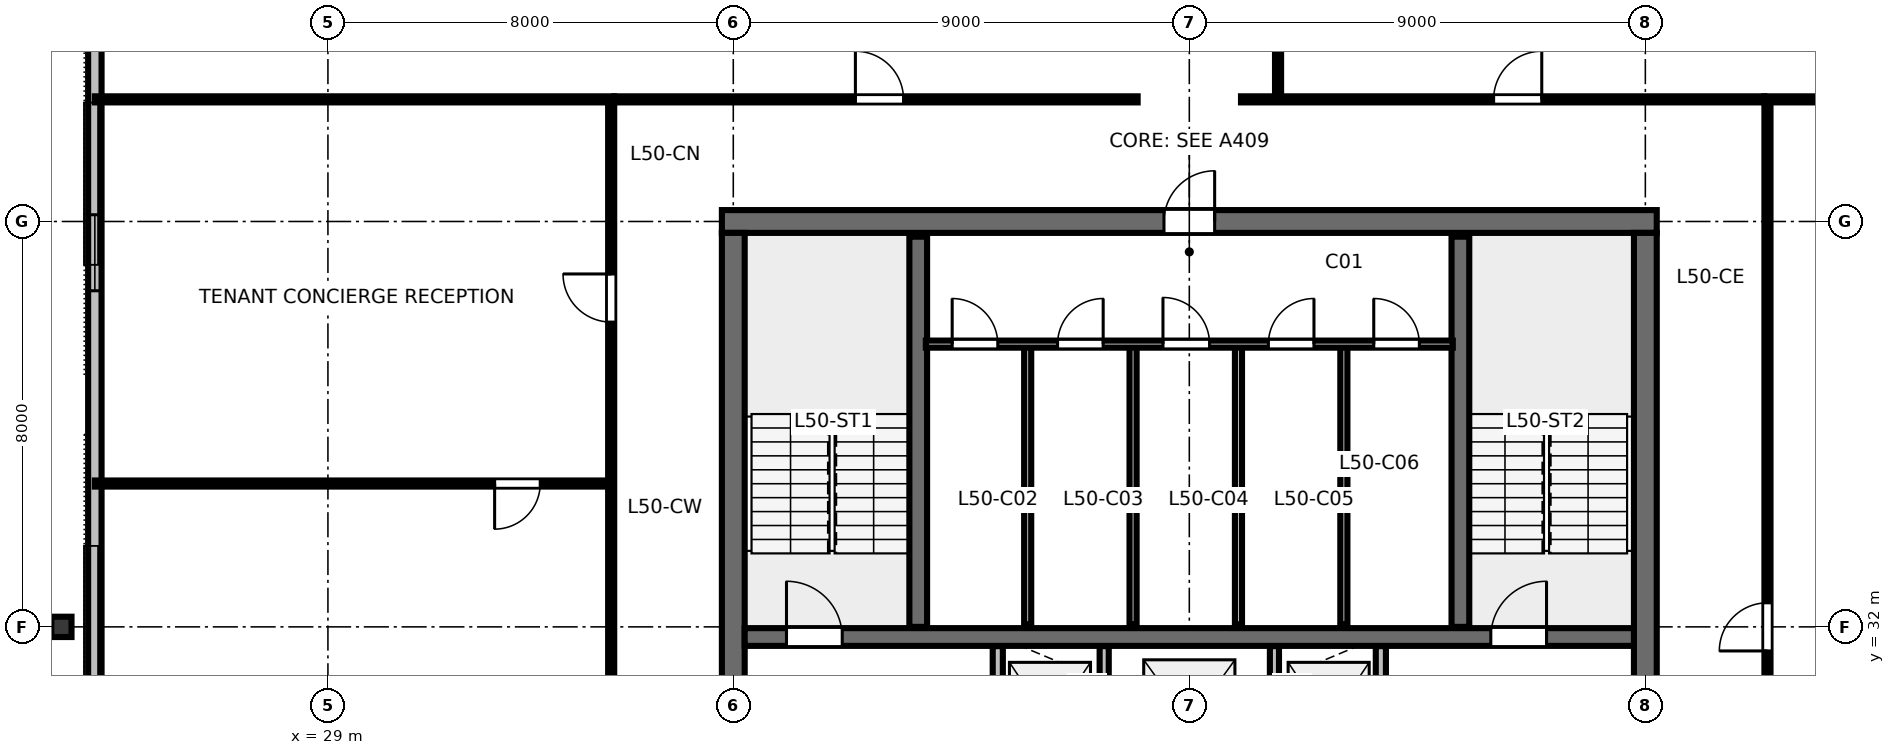
"""IFC4 building model, lengths in metres.
Left out: names, types, materials, properties, quantities, classifications, styles, units other than length and angle.
Written with IfcOpenShell. Run it as: python <this file> out.ifc"""

import sys

from ifc_helpers import new_model, si_unit, direction, frame, frame_2d, origin, origin_2d, place, context, subcontext, project, spatial, rectangle, i_section, extrude, element, fill, save


model = new_model("IFC4")
c1 = context("Model", 3, precision=1e-05, world=origin(), true_north=direction((0.0, 1.0)))
c2 = subcontext(c1, "Body", "Model", "MODEL_VIEW")
j1 = project(units=[si_unit("LENGTHUNIT", "METRE"), si_unit("PLANEANGLEUNIT", "RADIAN")], contexts=[c1])
p1 = place(None, origin())
s1 = spatial("IfcSite", under=j1, at=p1, CompositionType="ELEMENT")
p2 = place(p1, origin())
s2 = spatial("IfcBuilding", under=s1, at=p2, CompositionType="ELEMENT")
p3 = place(p2, frame((0.0, 0.0, 191.4)))
s3 = spatial("IfcBuildingStorey", under=s2, at=p3, CompositionType="ELEMENT", Elevation=191.4)
p4 = place(p3, frame((36.775, 40.0, 0.0), z_axis=(0.0, 0.0, 1.0), x_axis=(1.0, 0.0, 0.0)))
e1 = element("IfcWall", 1, at=p4, inside=s3, PredefinedType="SHEAR", context=c2, shape_type="SweptSolid", body=[
    extrude(rectangle(XDim=18.45, YDim=0.45, at=frame_2d((9.225, 0.0))), origin(), (0.0, 0.0, 1.0), 3.36),
])
p5 = place(p4, frame((8.725, 0.0, 0.0)))
e2 = element("IfcOpeningElement", 2, at=p5, cuts=e1, PredefinedType="OPENING", context=c2, shape_type="SweptSolid", body=[
    extrude(rectangle(XDim=1.0, YDim=2.15, at=frame_2d((0.5, 1.075))), frame((0.0, 0.235, 0.0), z_axis=(0.0, -1.0, 0.0), x_axis=(1.0, 0.0, 0.0)), (0.0, 0.0, 1.0), 0.47),
])
p6 = place(p3, frame((37.0, 24.225, 0.0), z_axis=(0.0, 0.0, 1.0), x_axis=(0.0, 1.0, 0.0)))
e3 = element("IfcWall", 3, at=p6, inside=s3, PredefinedType="SHEAR", context=c2, shape_type="SweptSolid", body=[
    extrude(rectangle(XDim=15.55, YDim=0.45, at=frame_2d((7.775, 0.0))), origin(), (0.0, 0.0, 1.0), 3.36),
])
p7 = place(p6, frame((5.3, 0.0, 0.0)))
e4 = element("IfcOpeningElement", 4, at=p7, cuts=e3, PredefinedType="OPENING", context=c2, shape_type="SweptSolid", body=[
    extrude(rectangle(XDim=1.15, YDim=2.15, at=frame_2d((0.575, 1.075))), frame((0.0, 0.235, 0.0), z_axis=(0.0, -1.0, 0.0), x_axis=(1.0, 0.0, 0.0)), (0.0, 0.0, 1.0), 0.47),
])
p8 = place(p3, frame((55.0, 24.225, 0.0), z_axis=(0.0, 0.0, 1.0), x_axis=(0.0, 1.0, 0.0)))
e5 = element("IfcWall", 5, at=p8, inside=s3, PredefinedType="SHEAR", context=c2, shape_type="SweptSolid", body=[
    extrude(rectangle(XDim=15.55, YDim=0.45, at=frame_2d((7.775, 0.0))), origin(), (0.0, 0.0, 1.0), 3.36),
])
p9 = place(p8, frame((5.3, 0.0, 0.0)))
e6 = element("IfcOpeningElement", 6, at=p9, cuts=e5, PredefinedType="OPENING", context=c2, shape_type="SweptSolid", body=[
    extrude(rectangle(XDim=1.15, YDim=2.15, at=frame_2d((0.575, 1.075))), frame((0.0, 0.235, 0.0), z_axis=(0.0, -1.0, 0.0), x_axis=(1.0, 0.0, 0.0)), (0.0, 0.0, 1.0), 0.47),
])
p10 = place(p3, frame((37.225, 31.8, 0.0), z_axis=(0.0, 0.0, 1.0), x_axis=(1.0, 0.0, 0.0)))
e7 = element("IfcWall", 7, at=p10, inside=s3, PredefinedType="SHEAR", context=c2, shape_type="SweptSolid", body=[
    extrude(rectangle(XDim=17.55, YDim=0.35, at=frame_2d((8.775, 0.0))), origin(), (0.0, 0.0, 1.0), 3.36),
])
p11 = place(p10, frame((0.825, 0.0, 0.0)))
e8 = element("IfcOpeningElement", 8, at=p11, cuts=e7, PredefinedType="OPENING", context=c2, shape_type="SweptSolid", body=[
    extrude(rectangle(XDim=1.1, YDim=2.15, at=frame_2d((0.55, 1.075))), frame((0.0, 0.185, 0.0), z_axis=(0.0, -1.0, 0.0), x_axis=(1.0, 0.0, 0.0)), (0.0, 0.0, 1.0), 0.37),
])
p12 = place(p10, frame((14.725, 0.0, 0.0)))
e9 = element("IfcOpeningElement", 9, at=p12, cuts=e7, PredefinedType="OPENING", context=c2, shape_type="SweptSolid", body=[
    extrude(rectangle(XDim=1.1, YDim=2.15, at=frame_2d((0.55, 1.075))), frame((0.0, 0.185, 0.0), z_axis=(0.0, -1.0, 0.0), x_axis=(1.0, 0.0, 0.0)), (0.0, 0.0, 1.0), 0.37),
])
p13 = place(p3, frame((23.74, 32.0, 0.0), z_axis=(0.0, 0.0, 1.0), x_axis=(0.0, 1.0, 0.0)))
e10 = element("IfcColumn", 10, at=p13, inside=s3, PredefinedType="COLUMN", context=c2, shape_type="SweptSolid", body=[
    extrude(i_section(OverallWidth=0.401, OverallDepth=0.399, WebThickness=0.025, FlangeThickness=0.04, FilletRadius=0.025, at=origin_2d()), origin(), (0.0, 0.0, 1.0), 3.373),
])
p14 = place(p3, frame((24.4, 46.02, 0.0), z_axis=(0.0, 0.0, 1.0), x_axis=(0.0, -1.0, 0.0)))
e11 = element("IfcWall", 11, at=p14, inside=s3, PredefinedType="STANDARD", context=c2, shape_type="SweptSolid", body=[
    extrude(rectangle(XDim=28.04, YDim=0.265, at=frame_2d((14.02, 0.0))), origin(), (0.0, 0.0, 1.0), 3.375),
])
p15 = place(p14, frame((5.887, 0.0, 0.85)))
e12 = element("IfcOpeningElement", 12, at=p15, cuts=e11, PredefinedType="OPENING", context=c2, shape_type="SweptSolid", body=[
    extrude(rectangle(XDim=1.5, YDim=1.85, at=frame_2d((0.75, 0.925))), frame((0.0, 0.142, 0.0), z_axis=(0.0, -1.0, 0.0), x_axis=(1.0, 0.0, 0.0)), (0.0, 0.0, 1.0), 0.285),
])
p16 = place(p14, frame((16.961, 0.0, 0.85)))
e13 = element("IfcOpeningElement", 13, at=p16, cuts=e11, PredefinedType="OPENING", context=c2, shape_type="SweptSolid", body=[
    extrude(rectangle(XDim=1.5, YDim=1.85, at=frame_2d((0.75, 0.925))), frame((0.0, 0.142, 0.0), z_axis=(0.0, -1.0, 0.0), x_axis=(1.0, 0.0, 0.0)), (0.0, 0.0, 1.0), 0.285),
])
p17 = place(p14, frame((20.653, 0.0, 0.85)))
e14 = element("IfcOpeningElement", 14, at=p17, cuts=e11, PredefinedType="OPENING", context=c2, shape_type="SweptSolid", body=[
    extrude(rectangle(XDim=1.5, YDim=1.85, at=frame_2d((0.75, 0.925))), frame((0.0, 0.142, 0.0), z_axis=(0.0, -1.0, 0.0), x_axis=(1.0, 0.0, 0.0)), (0.0, 0.0, 1.0), 0.285),
])
for number, where, z_axis, x_axis in (
    (15, (40.65, 32.0, 0.0), (0.0, 0.0, 1.0), (0.0, 1.0, 0.0)),
    (16, (51.35, 32.0, 0.0), (0.0, 0.0, 1.0), (0.0, 1.0, 0.0)),
):
    element("IfcWall", number, at=place(p3, frame(where, z_axis=z_axis, x_axis=x_axis)), inside=s3, PredefinedType="SHEAR", context=c2, shape_type="SweptSolid", body=[
        extrude(rectangle(XDim=7.7, YDim=0.35, at=frame_2d((3.85, 0.0))), origin(), (0.0, 0.0, 1.0), 3.6),
    ])
for number, where, z_axis, x_axis in (
    (17, (42.81, 32.05, 0.0), (0.0, 0.0, 1.0), (0.0, 1.0, 0.0)),
    (18, (44.89, 32.05, 0.0), (0.0, 0.0, 1.0), (0.0, 1.0, 0.0)),
    (19, (46.97, 32.05, 0.0), (0.0, 0.0, 1.0), (0.0, 1.0, 0.0)),
    (20, (49.05, 32.05, 0.0), (0.0, 0.0, 1.0), (0.0, 1.0, 0.0)),
):
    element("IfcWall", number, at=place(p3, frame(where, z_axis=z_axis, x_axis=x_axis)), inside=s3, PredefinedType="PARTITIONING", context=c2, shape_type="SweptSolid", body=[
        extrude(rectangle(XDim=5.5, YDim=0.14, at=frame_2d((2.75, 0.0))), origin(), (0.0, 0.0, 1.0), 3.375),
    ])
p18 = place(p3, frame((40.8, 37.58, 0.0), z_axis=(0.0, 0.0, 1.0), x_axis=(1.0, 0.0, 0.0)))
e21 = element("IfcWall", 21, at=p18, inside=s3, PredefinedType="PARTITIONING", context=c2, shape_type="SweptSolid", body=[
    extrude(rectangle(XDim=10.4, YDim=0.14, at=frame_2d((5.2, 0.0))), origin(), (0.0, 0.0, 1.0), 3.375),
])
p19 = place(p18, frame((0.52, 0.0, 0.0)))
e22 = element("IfcOpeningElement", 22, at=p19, cuts=e21, PredefinedType="OPENING", context=c2, shape_type="SweptSolid", body=[
    extrude(rectangle(XDim=0.9, YDim=2.15, at=frame_2d((0.45, 1.075))), frame((0.0, 0.08, 0.0), z_axis=(0.0, -1.0, 0.0), x_axis=(1.0, 0.0, 0.0)), (0.0, 0.0, 1.0), 0.16),
])
p20 = place(p18, frame((2.6, 0.0, 0.0)))
e23 = element("IfcOpeningElement", 23, at=p20, cuts=e21, PredefinedType="OPENING", context=c2, shape_type="SweptSolid", body=[
    extrude(rectangle(XDim=0.9, YDim=2.15, at=frame_2d((0.45, 1.075))), frame((0.0, 0.08, 0.0), z_axis=(0.0, -1.0, 0.0), x_axis=(1.0, 0.0, 0.0)), (0.0, 0.0, 1.0), 0.16),
])
p21 = place(p18, frame((4.68, 0.0, 0.0)))
e24 = element("IfcOpeningElement", 24, at=p21, cuts=e21, PredefinedType="OPENING", context=c2, shape_type="SweptSolid", body=[
    extrude(rectangle(XDim=0.92, YDim=2.15, at=frame_2d((0.46, 1.075))), frame((0.0, 0.08, 0.0), z_axis=(0.0, -1.0, 0.0), x_axis=(1.0, 0.0, 0.0)), (0.0, 0.0, 1.0), 0.16),
])
p22 = place(p18, frame((6.76, 0.0, 0.0)))
e25 = element("IfcOpeningElement", 25, at=p22, cuts=e21, PredefinedType="OPENING", context=c2, shape_type="SweptSolid", body=[
    extrude(rectangle(XDim=0.9, YDim=2.15, at=frame_2d((0.45, 1.075))), frame((0.0, 0.08, 0.0), z_axis=(0.0, -1.0, 0.0), x_axis=(1.0, 0.0, 0.0)), (0.0, 0.0, 1.0), 0.16),
])
p23 = place(p18, frame((8.84, 0.0, 0.0)))
e26 = element("IfcOpeningElement", 26, at=p23, cuts=e21, PredefinedType="OPENING", context=c2, shape_type="SweptSolid", body=[
    extrude(rectangle(XDim=0.9, YDim=2.15, at=frame_2d((0.45, 1.075))), frame((0.0, 0.08, 0.0), z_axis=(0.0, -1.0, 0.0), x_axis=(1.0, 0.0, 0.0)), (0.0, 0.0, 1.0), 0.16),
])
p24 = place(p3, frame((42.22, 28.58, 0.0), z_axis=(0.0, 0.0, 1.0), x_axis=(0.0, 1.0, 0.0)))
e27 = element("IfcWall", 27, at=p24, inside=s3, PredefinedType="PARTITIONING", context=c2, shape_type="SweptSolid", body=[
    extrude(rectangle(XDim=3.04, YDim=0.2, at=frame_2d((1.52, 0.0))), origin(), (0.0, 0.0, 1.0), 3.375),
])
p25 = place(p24, frame((0.95, 0.0, 0.0)))
e28 = element("IfcOpeningElement", 28, at=p25, cuts=e27, PredefinedType="OPENING", context=c2, shape_type="SweptSolid", body=[
    extrude(rectangle(XDim=1.05, YDim=2.15, at=frame_2d((0.525, 1.075))), frame((0.0, 0.11, 0.0), z_axis=(0.0, -1.0, 0.0), x_axis=(1.0, 0.0, 0.0)), (0.0, 0.0, 1.0), 0.22),
])
p26 = place(p3, frame((49.78, 28.58, 0.0), z_axis=(0.0, 0.0, 1.0), x_axis=(0.0, 1.0, 0.0)))
e29 = element("IfcWall", 29, at=p26, inside=s3, PredefinedType="PARTITIONING", context=c2, shape_type="SweptSolid", body=[
    extrude(rectangle(XDim=3.04, YDim=0.2, at=frame_2d((1.52, 0.0))), origin(), (0.0, 0.0, 1.0), 3.375),
])
p27 = place(p26, frame((0.95, 0.0, 0.0)))
e30 = element("IfcOpeningElement", 30, at=p27, cuts=e29, PredefinedType="OPENING", context=c2, shape_type="SweptSolid", body=[
    extrude(rectangle(XDim=1.05, YDim=2.15, at=frame_2d((0.525, 1.075))), frame((0.0, 0.11, 0.0), z_axis=(0.0, -1.0, 0.0), x_axis=(1.0, 0.0, 0.0)), (0.0, 0.0, 1.0), 0.22),
])
for number, where, z_axis, x_axis in (
    (31, (44.32, 28.58, 0.0), (0.0, 0.0, 1.0), (0.0, 1.0, 0.0)),
    (32, (47.68, 28.58, 0.0), (0.0, 0.0, 1.0), (0.0, 1.0, 0.0)),
):
    element("IfcWall", number, at=place(p3, frame(where, z_axis=z_axis, x_axis=x_axis)), inside=s3, PredefinedType="PARTITIONING", context=c2, shape_type="SweptSolid", body=[
        extrude(rectangle(XDim=3.04, YDim=0.18, at=frame_2d((1.52, 0.0))), origin(), (0.0, 0.0, 1.0), 3.375),
    ])
p28 = place(p3, frame((47.751, 42.41, 0.0), z_axis=(0.0, 0.0, 1.0), x_axis=(0.0, 1.0, 0.0)))
e33 = element("IfcWall", 33, at=p28, inside=s3, PredefinedType="PARTITIONING", context=c2, shape_type="SweptSolid", body=[
    extrude(rectangle(XDim=8.67, YDim=0.12, at=frame_2d((4.335, 0.0))), origin(), (0.0, 0.0, 1.0), 2.655),
])
p29 = place(p28, frame((1.4, 0.0, 0.0)))
e34 = element("IfcOpeningElement", 34, at=p29, cuts=e33, PredefinedType="OPENING", context=c2, shape_type="SweptSolid", body=[
    extrude(rectangle(XDim=0.9, YDim=2.15, at=frame_2d((0.45, 1.075))), frame((0.0, 0.07, 0.0), z_axis=(0.0, -1.0, 0.0), x_axis=(1.0, 0.0, 0.0)), (0.0, 0.0, 1.0), 0.14),
])
p30 = place(p3, frame((34.65, 42.41, 0.0), z_axis=(0.0, 0.0, 1.0), x_axis=(1.0, 0.0, 0.0)))
e35 = element("IfcWall", 35, at=p30, inside=s3, PredefinedType="PARTITIONING", context=c2, shape_type="SweptSolid", body=[
    extrude(rectangle(XDim=10.33, YDim=0.12, at=frame_2d((5.165, 0.0))), origin(), (0.0, 0.0, 1.0), 2.655),
])
p31 = place(p30, frame((4.76, 0.0, 0.0)))
e36 = element("IfcOpeningElement", 36, at=p31, cuts=e35, PredefinedType="OPENING", context=c2, shape_type="SweptSolid", body=[
    extrude(rectangle(XDim=0.95, YDim=2.15, at=frame_2d((0.475, 1.075))), frame((0.0, 0.07, 0.0), z_axis=(0.0, -1.0, 0.0), x_axis=(1.0, 0.0, 0.0)), (0.0, 0.0, 1.0), 0.14),
])
p32 = place(p3, frame((47.02, 42.41, 0.0), z_axis=(0.0, 0.0, 1.0), x_axis=(1.0, 0.0, 0.0)))
e37 = element("IfcWall", 37, at=p32, inside=s3, PredefinedType="PARTITIONING", context=c2, shape_type="SweptSolid", body=[
    extrude(rectangle(XDim=10.33, YDim=0.12, at=frame_2d((5.165, 0.0))), origin(), (0.0, 0.0, 1.0), 2.655),
])
p33 = place(p32, frame((4.986, 0.0, 0.0)))
e38 = element("IfcOpeningElement", 38, at=p33, cuts=e37, PredefinedType="OPENING", context=c2, shape_type="SweptSolid", body=[
    extrude(rectangle(XDim=0.95, YDim=2.15, at=frame_2d((0.475, 1.075))), frame((0.0, 0.07, 0.0), z_axis=(0.0, -1.0, 0.0), x_axis=(1.0, 0.0, 0.0)), (0.0, 0.0, 1.0), 0.14),
])
p34 = place(p3, frame((34.59, 34.829, 0.0), z_axis=(0.0, 0.0, 1.0), x_axis=(-1.0, 0.0, 0.0)))
e39 = element("IfcWall", 39, at=p34, inside=s3, PredefinedType="PARTITIONING", context=c2, shape_type="SweptSolid", body=[
    extrude(rectangle(XDim=10.19, YDim=0.12, at=frame_2d((5.095, 0.0))), origin(), (0.0, 0.0, 1.0), 2.655),
])
p35 = place(p34, frame((1.4, 0.0, 0.0)))
e40 = element("IfcOpeningElement", 40, at=p35, cuts=e39, PredefinedType="OPENING", context=c2, shape_type="SweptSolid", body=[
    extrude(rectangle(XDim=0.9, YDim=2.15, at=frame_2d((0.45, 1.075))), frame((0.0, 0.07, 0.0), z_axis=(0.0, -1.0, 0.0), x_axis=(1.0, 0.0, 0.0)), (0.0, 0.0, 1.0), 0.14),
])
p36 = place(p3, frame((34.59, 21.65, 0.0), z_axis=(0.0, 0.0, 1.0), x_axis=(0.0, 1.0, 0.0)))
e41 = element("IfcWall", 41, at=p36, inside=s3, PredefinedType="PARTITIONING", context=c2, shape_type="SweptSolid", body=[
    extrude(rectangle(XDim=20.7, YDim=0.12, at=frame_2d((10.35, 0.0))), origin(), (0.0, 0.0, 1.0), 2.655),
])
p37 = place(p36, frame((6.214, 0.0, 0.0)))
e42 = element("IfcOpeningElement", 42, at=p37, cuts=e41, PredefinedType="OPENING", context=c2, shape_type="SweptSolid", body=[
    extrude(rectangle(XDim=0.95, YDim=2.15, at=frame_2d((0.475, 1.075))), frame((0.0, 0.07, 0.0), z_axis=(0.0, -1.0, 0.0), x_axis=(1.0, 0.0, 0.0)), (0.0, 0.0, 1.0), 0.14),
])
p38 = place(p36, frame((16.365, 0.0, 0.0)))
e43 = element("IfcOpeningElement", 43, at=p38, cuts=e41, PredefinedType="OPENING", context=c2, shape_type="SweptSolid", body=[
    extrude(rectangle(XDim=0.95, YDim=2.15, at=frame_2d((0.475, 1.075))), frame((0.0, 0.07, 0.0), z_axis=(0.0, -1.0, 0.0), x_axis=(1.0, 0.0, 0.0)), (0.0, 0.0, 1.0), 0.14),
])
p39 = place(p3, frame((57.41, 21.65, 0.0), z_axis=(0.0, 0.0, 1.0), x_axis=(0.0, 1.0, 0.0)))
e44 = element("IfcWall", 44, at=p39, inside=s3, PredefinedType="PARTITIONING", context=c2, shape_type="SweptSolid", body=[
    extrude(rectangle(XDim=20.7, YDim=0.12, at=frame_2d((10.35, 0.0))), origin(), (0.0, 0.0, 1.0), 2.655),
])
p40 = place(p39, frame((9.875, 0.0, 0.0)))
e45 = element("IfcOpeningElement", 45, at=p40, cuts=e44, PredefinedType="OPENING", context=c2, shape_type="SweptSolid", body=[
    extrude(rectangle(XDim=0.95, YDim=2.15, at=frame_2d((0.475, 1.075))), frame((0.0, 0.07, 0.0), z_axis=(0.0, -1.0, 0.0), x_axis=(1.0, 0.0, 0.0)), (0.0, 0.0, 1.0), 0.14),
])
for number, where, z_axis, x_axis in (
    (46, (34.65, 42.41, 0.0), (0.0, 0.0, 1.0), (-1.0, 0.0, 0.0)),
    (47, (57.35, 42.41, 0.0), (0.0, 0.0, 1.0), (1.0, 0.0, 0.0)),
):
    element("IfcWall", number, at=place(p3, frame(where, z_axis=z_axis, x_axis=x_axis)), inside=s3, PredefinedType="PARTITIONING", context=c2, shape_type="SweptSolid", body=[
        extrude(rectangle(XDim=10.25, YDim=0.12, at=frame_2d((5.125, 0.0))), origin(), (0.0, 0.0, 1.0), 2.655),
    ])
p41 = place(p15, origin())
e48 = element("IfcWindow", 48, at=p41, inside=s3, PartitioningType="SINGLE_PANEL", PredefinedType="WINDOW", context=c2, shape_type="SweptSolid", body=[
    extrude(rectangle(XDim=1.5, YDim=1.85, at=frame_2d((0.75, 0.925))), frame((0.0, 0.03, 0.0), z_axis=(0.0, -1.0, 0.0), x_axis=(1.0, 0.0, 0.0)), (0.0, 0.0, 1.0), 0.06),
])
fill(e12, e48)
p42 = place(p11, origin())
e49 = element("IfcDoor", 49, at=p42, inside=s3, OperationType="SINGLE_SWING_LEFT", PredefinedType="DOOR", context=c2, shape_type="SweptSolid", body=[
    extrude(rectangle(XDim=1.1, YDim=2.15, at=frame_2d((0.55, 1.075))), frame((0.0, 0.025, 0.0), z_axis=(0.0, -1.0, 0.0), x_axis=(1.0, 0.0, 0.0)), (0.0, 0.0, 1.0), 0.05),
])
fill(e8, e49)
p43 = place(p12, origin())
e50 = element("IfcDoor", 50, at=p43, inside=s3, OperationType="SINGLE_SWING_RIGHT", PredefinedType="DOOR", context=c2, shape_type="SweptSolid", body=[
    extrude(rectangle(XDim=1.1, YDim=2.15, at=frame_2d((0.55, 1.075))), frame((0.0, 0.025, 0.0), z_axis=(0.0, -1.0, 0.0), x_axis=(1.0, 0.0, 0.0)), (0.0, 0.0, 1.0), 0.05),
])
fill(e9, e50)
p44 = place(p5, origin())
e51 = element("IfcDoor", 51, at=p44, inside=s3, OperationType="SINGLE_SWING_RIGHT", PredefinedType="DOOR", context=c2, shape_type="SweptSolid", body=[
    extrude(rectangle(XDim=1.0, YDim=2.15, at=frame_2d((0.5, 1.075))), frame((0.0, 0.025, 0.0), z_axis=(0.0, -1.0, 0.0), x_axis=(1.0, 0.0, 0.0)), (0.0, 0.0, 1.0), 0.05),
])
fill(e2, e51)
p45 = place(p19, origin())
e52 = element("IfcDoor", 52, at=p45, inside=s3, OperationType="SINGLE_SWING_LEFT", PredefinedType="DOOR", context=c2, shape_type="SweptSolid", body=[
    extrude(rectangle(XDim=0.9, YDim=2.15, at=frame_2d((0.45, 1.075))), frame((0.0, 0.025, 0.0), z_axis=(0.0, -1.0, 0.0), x_axis=(1.0, 0.0, 0.0)), (0.0, 0.0, 1.0), 0.05),
])
fill(e22, e52)
p46 = place(p20, origin())
e53 = element("IfcDoor", 53, at=p46, inside=s3, OperationType="SINGLE_SWING_RIGHT", PredefinedType="DOOR", context=c2, shape_type="SweptSolid", body=[
    extrude(rectangle(XDim=0.9, YDim=2.15, at=frame_2d((0.45, 1.075))), frame((0.0, 0.025, 0.0), z_axis=(0.0, -1.0, 0.0), x_axis=(1.0, 0.0, 0.0)), (0.0, 0.0, 1.0), 0.05),
])
fill(e23, e53)
p47 = place(p21, origin())
e54 = element("IfcDoor", 54, at=p47, inside=s3, OperationType="SINGLE_SWING_LEFT", PredefinedType="DOOR", context=c2, shape_type="SweptSolid", body=[
    extrude(rectangle(XDim=0.92, YDim=2.15, at=frame_2d((0.46, 1.075))), frame((0.0, 0.025, 0.0), z_axis=(0.0, -1.0, 0.0), x_axis=(1.0, 0.0, 0.0)), (0.0, 0.0, 1.0), 0.05),
])
fill(e24, e54)
p48 = place(p22, origin())
e55 = element("IfcDoor", 55, at=p48, inside=s3, OperationType="SINGLE_SWING_RIGHT", PredefinedType="DOOR", context=c2, shape_type="SweptSolid", body=[
    extrude(rectangle(XDim=0.9, YDim=2.15, at=frame_2d((0.45, 1.075))), frame((0.0, 0.025, 0.0), z_axis=(0.0, -1.0, 0.0), x_axis=(1.0, 0.0, 0.0)), (0.0, 0.0, 1.0), 0.05),
])
fill(e25, e55)
p49 = place(p23, origin())
e56 = element("IfcDoor", 56, at=p49, inside=s3, OperationType="SINGLE_SWING_LEFT", PredefinedType="DOOR", context=c2, shape_type="SweptSolid", body=[
    extrude(rectangle(XDim=0.9, YDim=2.15, at=frame_2d((0.45, 1.075))), frame((0.0, 0.025, 0.0), z_axis=(0.0, -1.0, 0.0), x_axis=(1.0, 0.0, 0.0)), (0.0, 0.0, 1.0), 0.05),
])
fill(e26, e56)
p50 = place(p31, origin())
e57 = element("IfcDoor", 57, at=p50, inside=s3, OperationType="SINGLE_SWING_LEFT", PredefinedType="DOOR", context=c2, shape_type="SweptSolid", body=[
    extrude(rectangle(XDim=0.95, YDim=2.15, at=frame_2d((0.475, 1.075))), frame((0.0, 0.025, 0.0), z_axis=(0.0, -1.0, 0.0), x_axis=(1.0, 0.0, 0.0)), (0.0, 0.0, 1.0), 0.05),
])
fill(e36, e57)
p51 = place(p33, origin())
e58 = element("IfcDoor", 58, at=p51, inside=s3, OperationType="SINGLE_SWING_RIGHT", PredefinedType="DOOR", context=c2, shape_type="SweptSolid", body=[
    extrude(rectangle(XDim=0.95, YDim=2.15, at=frame_2d((0.475, 1.075))), frame((0.0, 0.025, 0.0), z_axis=(0.0, -1.0, 0.0), x_axis=(1.0, 0.0, 0.0)), (0.0, 0.0, 1.0), 0.05),
])
fill(e38, e58)
p52 = place(p35, origin())
e59 = element("IfcDoor", 59, at=p52, inside=s3, OperationType="SINGLE_SWING_RIGHT", PredefinedType="DOOR", context=c2, shape_type="SweptSolid", body=[
    extrude(rectangle(XDim=0.9, YDim=2.15, at=frame_2d((0.45, 1.075))), frame((0.0, 0.025, 0.0), z_axis=(0.0, -1.0, 0.0), x_axis=(1.0, 0.0, 0.0)), (0.0, 0.0, 1.0), 0.05),
])
fill(e40, e59)
p53 = place(p38, origin())
e60 = element("IfcDoor", 60, at=p53, inside=s3, OperationType="SINGLE_SWING_RIGHT", PredefinedType="DOOR", context=c2, shape_type="SweptSolid", body=[
    extrude(rectangle(XDim=0.95, YDim=2.15, at=frame_2d((0.475, 1.075))), frame((0.0, 0.025, 0.0), z_axis=(0.0, -1.0, 0.0), x_axis=(1.0, 0.0, 0.0)), (0.0, 0.0, 1.0), 0.05),
])
fill(e43, e60)
p54 = place(p40, origin())
e61 = element("IfcDoor", 61, at=p54, inside=s3, OperationType="SINGLE_SWING_LEFT", PredefinedType="DOOR", context=c2, shape_type="SweptSolid", body=[
    extrude(rectangle(XDim=0.95, YDim=2.15, at=frame_2d((0.475, 1.075))), frame((0.0, 0.025, 0.0), z_axis=(0.0, -1.0, 0.0), x_axis=(1.0, 0.0, 0.0)), (0.0, 0.0, 1.0), 0.05),
])
fill(e45, e61)
save(model, sys.argv[1])
